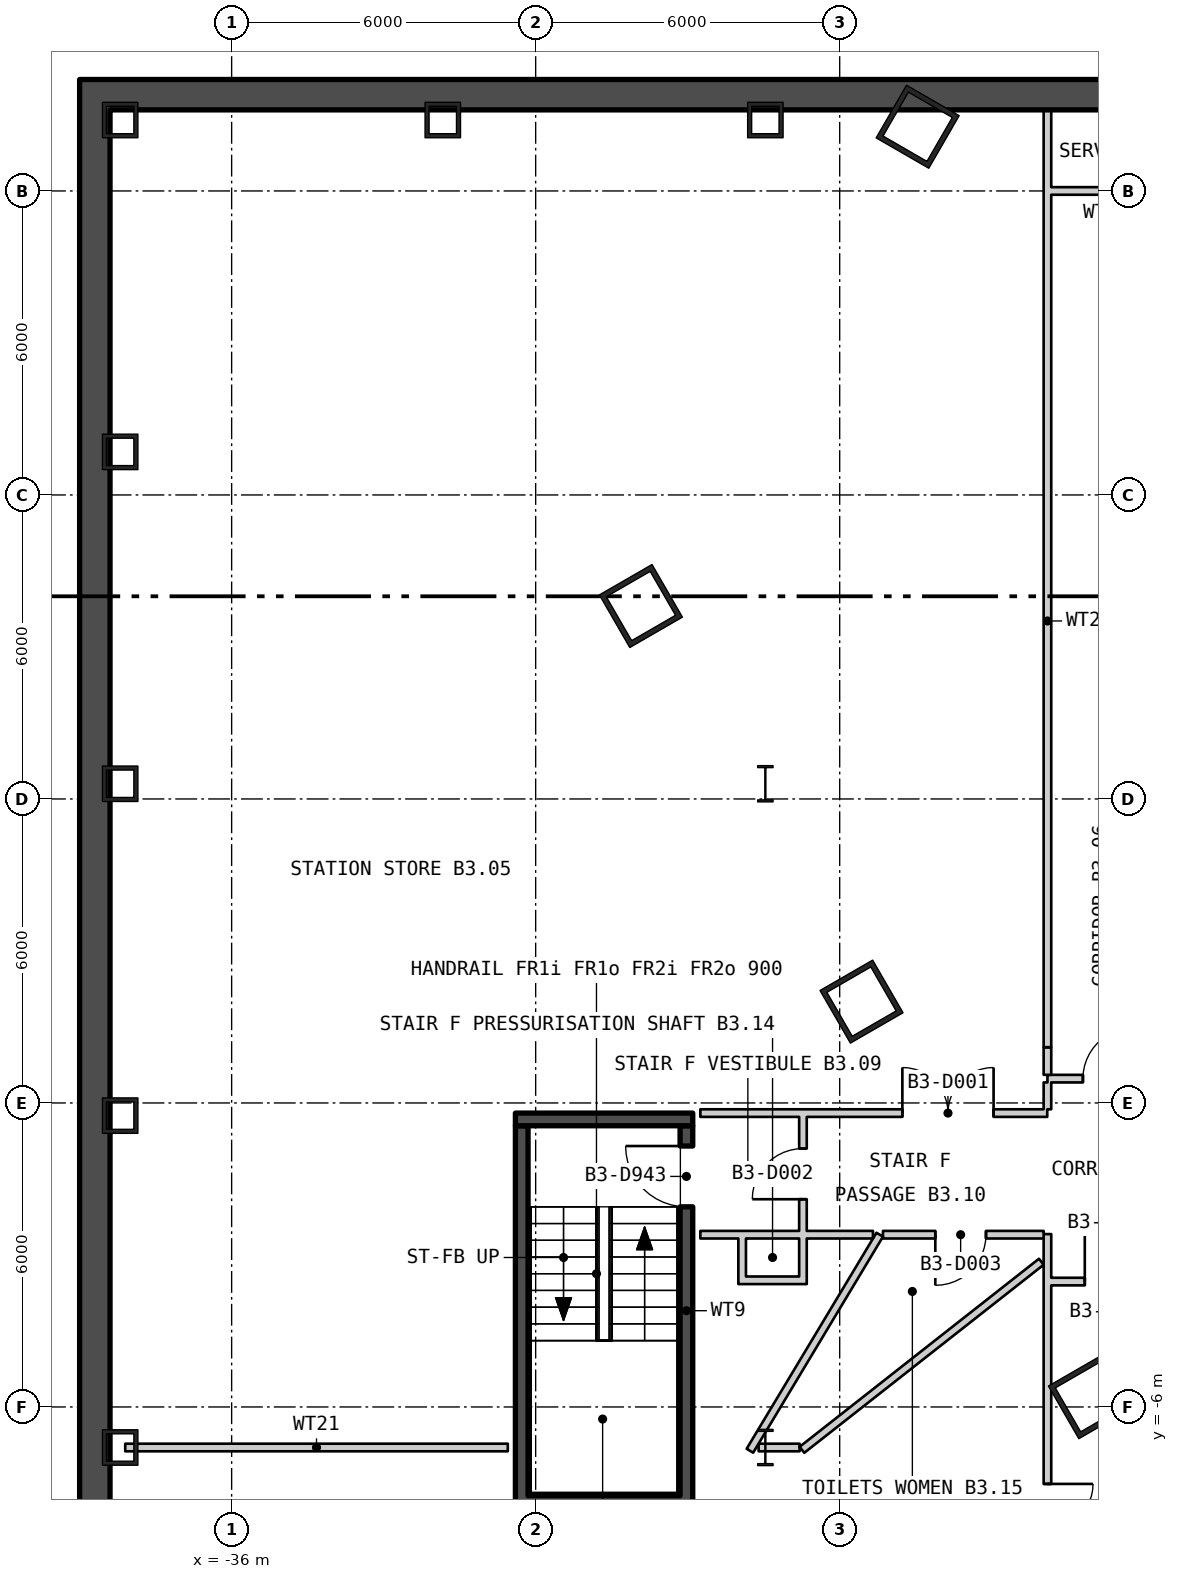
"""IFC4 building model, lengths in metres.
Left out: names, types, materials, properties, quantities, classifications, styles, units other than length and angle.
Written with IfcOpenShell. Run it as: python <this file> out.ifc"""

import sys

from ifc_helpers import new_model, si_unit, direction, frame, frame_2d, origin, origin_2d, place, context, subcontext, project, spatial, rectangle, hollow_rectangle, i_section, extrude, element, fill, save


model = new_model("IFC4")
c1 = context("Model", 3, precision=1e-05, world=origin(), true_north=direction((0.0, 1.0)))
c2 = subcontext(c1, "Body", "Model", "MODEL_VIEW")
j1 = project(units=[si_unit("LENGTHUNIT", "METRE"), si_unit("PLANEANGLEUNIT", "RADIAN")], contexts=[c1])
p1 = place(None, origin())
s1 = spatial("IfcSite", under=j1, at=p1, CompositionType="ELEMENT")
p2 = place(p1, origin())
s2 = spatial("IfcBuilding", under=s1, at=p2, CompositionType="ELEMENT")
p3 = place(p2, frame((0.0, 0.0, -16.8)))
s3 = spatial("IfcBuildingStorey", under=s2, at=p3, CompositionType="ELEMENT", Elevation=-16.8)
for number, where, z_axis, x_axis in (
    (1, (-22.461, 19.267, 0.0), (0.0, 0.0, 1.0), (-0.5, -0.866, 0.0)),
    (2, (-27.923, 9.808, 0.0), (0.0, 0.0, 1.0), (0.5, -0.866, 0.0)),
    (3, (-23.569, 2.0, 0.0), (0.0, 0.0, 1.0), (0.5, -0.866, 0.0)),
    (4, (-19.061, -5.807, 0.0), (0.0, 0.0, 1.0), (0.5, -0.866, 0.0)),
):
    element("IfcColumn", number, at=place(p3, frame(where, z_axis=z_axis, x_axis=x_axis)), inside=s3, PredefinedType="COLUMN", context=c2, shape_type="SweptSolid", body=[
        extrude(hollow_rectangle(XDim=1.2, YDim=1.2, WallThickness=0.1, at=origin_2d()), origin(), (0.0, 0.0, 1.0), 5.4),
    ])
for number, where, z_axis, x_axis in (
    (5, (-25.467, 19.4, 0.0), (0.0, 0.0, 1.0), (-1.0, 0.0, 0.0)),
    (6, (-31.833, 19.4, 0.0), (0.0, 0.0, 1.0), (-1.0, 0.0, 0.0)),
    (7, (-38.2, 19.4, 0.0), (0.0, 0.0, 1.0), (0.0, -1.0, 0.0)),
    (8, (-38.2, 12.85, 0.0), (0.0, 0.0, 1.0), (0.0, -1.0, 0.0)),
    (9, (-38.2, 6.3, 0.0), (0.0, 0.0, 1.0), (0.0, -1.0, 0.0)),
    (10, (-38.2, -0.25, 0.0), (0.0, 0.0, 1.0), (0.0, -1.0, 0.0)),
    (11, (-38.2, -6.8, 0.0), (0.0, 0.0, 1.0), (0.0, -1.0, 0.0)),
):
    element("IfcColumn", number, at=place(p3, frame(where, z_axis=z_axis, x_axis=x_axis)), inside=s3, PredefinedType="COLUMN", context=c2, shape_type="SweptSolid", body=[
        extrude(hollow_rectangle(XDim=0.7, YDim=0.7, WallThickness=0.08, at=origin_2d()), origin(), (0.0, 0.0, 1.0), 5.4),
    ])
for number, where, z_axis, x_axis in (
    (12, (-25.467, 6.3, 0.0), (0.0, 0.0, 1.0), (1.0, 0.0, 0.0)),
    (13, (-25.467, -6.8, 0.0), (0.0, 0.0, 1.0), (1.0, 0.0, 0.0)),
):
    element("IfcColumn", number, at=place(p3, frame(where, z_axis=z_axis, x_axis=x_axis)), inside=s3, PredefinedType="COLUMN", context=c2, shape_type="SweptSolid", body=[
        extrude(i_section(OverallWidth=0.304, OverallDepth=0.716, WebThickness=0.021, FlangeThickness=0.04, at=origin_2d()), origin(), (0.0, 0.0, 1.0), 5.4),
    ])
p4 = place(p3, frame((-39.0, 19.9, -0.4), z_axis=(0.0, 0.0, 1.0), x_axis=(1.0, 0.0, 0.0)))
e14 = element("IfcWall", 14, at=p4, inside=s3, PredefinedType="STANDARD", context=c2, shape_type="SweptSolid", body=[
    extrude(rectangle(XDim=78.0, YDim=0.6, at=frame_2d((39.0, 0.0))), origin(), (0.0, 0.0, 1.0), 5.4),
])
p5 = place(p3, frame((-38.7, -33.2, -0.4), z_axis=(0.0, 0.0, 1.0), x_axis=(0.0, 1.0, 0.0)))
e15 = element("IfcWall", 15, at=p5, inside=s3, PredefinedType="STANDARD", context=c2, shape_type="SweptSolid", body=[
    extrude(rectangle(XDim=52.8, YDim=0.6, at=frame_2d((26.4, 0.0))), origin(), (0.0, 0.0, 1.0), 5.4),
])
p6 = place(p3, frame((-30.275, -7.75, 0.0), z_axis=(0.0, 0.0, 1.0), x_axis=(0.0, 1.0, 0.0)))
e16 = element("IfcWall", 16, at=p6, inside=s3, PredefinedType="SHEAR", context=c2, shape_type="SweptSolid", body=[
    extrude(rectangle(XDim=7.3, YDim=0.25, at=frame_2d((3.65, 0.0))), origin(), (0.0, 0.0, 1.0), 4.95),
])
p7 = place(p3, frame((-27.025, -7.75, 0.0), z_axis=(0.0, 0.0, 1.0), x_axis=(0.0, 1.0, 0.0)))
e17 = element("IfcWall", 17, at=p7, inside=s3, PredefinedType="SHEAR", context=c2, shape_type="SweptSolid", body=[
    extrude(rectangle(XDim=7.3, YDim=0.25, at=frame_2d((3.65, 0.0))), origin(), (0.0, 0.0, 1.0), 4.95),
])
p8 = place(p7, frame((5.7, 0.0, 0.0)))
e18 = element("IfcOpeningElement", 18, at=p8, cuts=e17, PredefinedType="OPENING", context=c2, shape_type="SweptSolid", body=[
    extrude(rectangle(XDim=1.2, YDim=2.1, at=frame_2d((0.6, 1.05))), frame((0.0, 0.135, 0.0), z_axis=(0.0, -1.0, 0.0), x_axis=(1.0, 0.0, 0.0)), (0.0, 0.0, 1.0), 0.27),
])
for number, where, z_axis, x_axis in (
    (19, (-30.4, -7.875, 0.0), (0.0, 0.0, 1.0), (1.0, 0.0, 0.0)),
    (20, (-30.4, -0.325, 0.0), (0.0, 0.0, 1.0), (1.0, 0.0, 0.0)),
):
    element("IfcWall", number, at=place(p3, frame(where, z_axis=z_axis, x_axis=x_axis)), inside=s3, PredefinedType="SHEAR", context=c2, shape_type="SweptSolid", body=[
        extrude(rectangle(XDim=3.5, YDim=0.25, at=frame_2d((1.75, 0.0))), origin(), (0.0, 0.0, 1.0), 4.95),
    ])
p9 = place(p3, frame((-38.1, -6.8, 0.0), z_axis=(0.0, 0.0, 1.0), x_axis=(1.0, 0.0, 0.0)))
e21 = element("IfcWall", 21, at=p9, inside=s3, PredefinedType="PARTITIONING", context=c2, shape_type="SweptSolid", body=[
    extrude(rectangle(XDim=7.55, YDim=0.15, at=frame_2d((3.775, 0.0))), origin(), (0.0, 0.0, 1.0), 4.95),
])
p10 = place(p3, frame((-26.75, -2.6, 0.0), z_axis=(0.0, 0.0, 1.0), x_axis=(1.0, 0.0, 0.0)))
e22 = element("IfcWall", 22, at=p10, inside=s3, PredefinedType="PARTITIONING", context=c2, shape_type="SweptSolid", body=[
    extrude(rectangle(XDim=0.813, YDim=0.15, at=frame_2d((0.406, 0.0))), origin(), (0.0, 0.0, 1.0), 4.95),
])
p11 = place(p3, frame((-26.75, -0.2, 0.0), z_axis=(0.0, 0.0, 1.0), x_axis=(1.0, 0.0, 0.0)))
e23 = element("IfcWall", 23, at=p11, inside=s3, PredefinedType="PARTITIONING", context=c2, shape_type="SweptSolid", body=[
    extrude(rectangle(XDim=6.846, YDim=0.15, at=frame_2d((3.423, 0.0))), origin(), (0.0, 0.0, 1.0), 4.95),
])
p12 = place(p11, frame((3.987, 0.0, 0.0)))
e24 = element("IfcOpeningElement", 24, at=p12, cuts=e23, PredefinedType="OPENING", context=c2, shape_type="SweptSolid", body=[
    extrude(rectangle(XDim=1.8, YDim=2.1, at=frame_2d((0.9, 1.05))), frame((0.0, 0.085, 0.0), z_axis=(0.0, -1.0, 0.0), x_axis=(1.0, 0.0, 0.0)), (0.0, 0.0, 1.0), 0.17),
])
p13 = place(p3, frame((-26.0, -3.5, 0.0), z_axis=(0.0, 0.0, 1.0), x_axis=(1.0, 0.0, 0.0)))
e25 = element("IfcWall", 25, at=p13, inside=s3, PredefinedType="PARTITIONING", context=c2, shape_type="SweptSolid", body=[
    extrude(rectangle(XDim=1.35, YDim=0.15, at=frame_2d((0.675, 0.0))), origin(), (0.0, 0.0, 1.0), 4.95),
])
p14 = place(p3, frame((-25.937, -2.6, 0.0), z_axis=(0.0, 0.0, 1.0), x_axis=(1.0, 0.0, 0.0)))
e26 = element("IfcWall", 26, at=p14, inside=s3, PredefinedType="PARTITIONING", context=c2, shape_type="SweptSolid", body=[
    extrude(rectangle(XDim=1.287, YDim=0.15, at=frame_2d((0.643, 0.0))), origin(), (0.0, 0.0, 1.0), 4.95),
])
p15 = place(p3, frame((-25.925, -3.425, 0.0), z_axis=(0.0, 0.0, 1.0), x_axis=(0.0, 1.0, 0.0)))
e27 = element("IfcWall", 27, at=p15, inside=s3, PredefinedType="PARTITIONING", context=c2, shape_type="SweptSolid", body=[
    extrude(rectangle(XDim=0.75, YDim=0.15, at=frame_2d((0.375, 0.0))), origin(), (0.0, 0.0, 1.0), 4.95),
])
p16 = place(p3, frame((-25.772, -6.864, 0.0), z_axis=(0.0, 0.0, 1.0), x_axis=(0.515027783153, 0.85717348453, 0.0)))
e28 = element("IfcWall", 28, at=p16, inside=s3, PredefinedType="PARTITIONING", context=c2, shape_type="SweptSolid", body=[
    extrude(rectangle(XDim=4.974, YDim=0.15, at=frame_2d((2.487, 0.0))), origin(), (0.0, 0.0, 1.0), 4.95),
])
p17 = place(p3, frame((-25.6, -6.8, 0.0), z_axis=(0.0, 0.0, 1.0), x_axis=(1.0, 0.0, 0.0)))
e29 = element("IfcWall", 29, at=p17, inside=s3, PredefinedType="PARTITIONING", context=c2, shape_type="SweptSolid", body=[
    extrude(rectangle(XDim=0.809, YDim=0.15, at=frame_2d((0.405, 0.0))), origin(), (0.0, 0.0, 1.0), 4.95),
])
p18 = place(p3, frame((-24.745, -6.846, 0.0), z_axis=(0.0, 0.0, 1.0), x_axis=(0.786295235231, 0.617850955372, 0.0)))
e30 = element("IfcWall", 30, at=p18, inside=s3, PredefinedType="PARTITIONING", context=c2, shape_type="SweptSolid", body=[
    extrude(rectangle(XDim=6.008, YDim=0.15, at=frame_2d((3.004, 0.0))), origin(), (0.0, 0.0, 1.0), 4.95),
])
p19 = place(p3, frame((-24.725, -3.425, 0.0), z_axis=(0.0, 0.0, 1.0), x_axis=(0.0, 1.0, 0.0)))
e31 = element("IfcWall", 31, at=p19, inside=s3, PredefinedType="PARTITIONING", context=c2, shape_type="SweptSolid", body=[
    extrude(rectangle(XDim=0.75, YDim=0.15, at=frame_2d((0.375, 0.0))), origin(), (0.0, 0.0, 1.0), 4.95),
])
p20 = place(p3, frame((-24.725, -2.525, 0.0), z_axis=(0.0, 0.0, 1.0), x_axis=(0.0, 1.0, 0.0)))
e32 = element("IfcWall", 32, at=p20, inside=s3, PredefinedType="PARTITIONING", context=c2, shape_type="SweptSolid", body=[
    extrude(rectangle(XDim=2.25, YDim=0.15, at=frame_2d((1.125, 0.0))), origin(), (0.0, 0.0, 1.0), 4.95),
])
p21 = place(p20, frame((0.625, 0.0, 0.0)))
e33 = element("IfcOpeningElement", 33, at=p21, cuts=e32, PredefinedType="OPENING", context=c2, shape_type="SweptSolid", body=[
    extrude(rectangle(XDim=1.0, YDim=2.1, at=frame_2d((0.5, 1.05))), frame((0.0, 0.085, 0.0), z_axis=(0.0, -1.0, 0.0), x_axis=(1.0, 0.0, 0.0)), (0.0, 0.0, 1.0), 0.17),
])
p22 = place(p3, frame((-24.65, -2.6, 0.0), z_axis=(0.0, 0.0, 1.0), x_axis=(1.0, 0.0, 0.0)))
e34 = element("IfcWall", 34, at=p22, inside=s3, PredefinedType="PARTITIONING", context=c2, shape_type="SweptSolid", body=[
    extrude(rectangle(XDim=1.307, YDim=0.15, at=frame_2d((0.653, 0.0))), origin(), (0.0, 0.0, 1.0), 4.95),
])
p23 = place(p3, frame((-23.146, -2.6, 0.0), z_axis=(0.0, 0.0, 1.0), x_axis=(1.0, 0.0, 0.0)))
e35 = element("IfcWall", 35, at=p23, inside=s3, PredefinedType="PARTITIONING", context=c2, shape_type="SweptSolid", body=[
    extrude(rectangle(XDim=3.171, YDim=0.15, at=frame_2d((1.585, 0.0))), origin(), (0.0, 0.0, 1.0), 4.95),
])
p24 = place(p23, frame((1.033, 0.0, 0.0)))
e36 = element("IfcOpeningElement", 36, at=p24, cuts=e35, PredefinedType="OPENING", context=c2, shape_type="SweptSolid", body=[
    extrude(rectangle(XDim=1.0, YDim=2.1, at=frame_2d((0.5, 1.05))), frame((0.0, 0.085, 0.0), z_axis=(0.0, -1.0, 0.0), x_axis=(1.0, 0.0, 0.0)), (0.0, 0.0, 1.0), 0.17),
])
p25 = place(p3, frame((-19.975, 18.0, 0.0), z_axis=(0.0, 0.0, 1.0), x_axis=(1.0, 0.0, 0.0)))
e37 = element("IfcWall", 37, at=p25, inside=s3, PredefinedType="PARTITIONING", context=c2, shape_type="SweptSolid", body=[
    extrude(rectangle(XDim=2.475, YDim=0.15, at=frame_2d((1.238, 0.0))), origin(), (0.0, 0.0, 1.0), 4.95),
])
p26 = place(p3, frame((-19.9, -14.627, 0.0), z_axis=(0.0, 0.0, 1.0), x_axis=(0.0, 1.0, 0.0)))
e38 = element("IfcWall", 38, at=p26, inside=s3, PredefinedType="PARTITIONING", context=c2, shape_type="SweptSolid", body=[
    extrude(rectangle(XDim=12.039, YDim=0.15, at=frame_2d((6.019, 0.0))), origin(), (0.0, 0.0, 1.0), 4.95),
])
p27 = place(p26, frame((0.2, 0.0, 0.0)))
e39 = element("IfcOpeningElement", 39, at=p27, cuts=e38, PredefinedType="OPENING", context=c2, shape_type="SweptSolid", body=[
    extrude(rectangle(XDim=1.8, YDim=2.1, at=frame_2d((0.9, 1.05))), frame((0.0, 0.085, 0.0), z_axis=(0.0, -1.0, 0.0), x_axis=(1.0, 0.0, 0.0)), (0.0, 0.0, 1.0), 0.17),
])
p28 = place(p26, frame((5.308, 0.0, 0.0)))
e40 = element("IfcOpeningElement", 40, at=p28, cuts=e38, PredefinedType="OPENING", context=c2, shape_type="SweptSolid", body=[
    extrude(rectangle(XDim=1.8, YDim=2.1, at=frame_2d((0.9, 1.05))), frame((0.0, 0.085, 0.0), z_axis=(0.0, -1.0, 0.0), x_axis=(1.0, 0.0, 0.0)), (0.0, 0.0, 1.0), 0.17),
])
p29 = place(p3, frame((-19.9, -0.125, 0.0), z_axis=(0.0, 0.0, 1.0), x_axis=(0.0, 1.0, 0.0)))
e41 = element("IfcWall", 41, at=p29, inside=s3, PredefinedType="PARTITIONING", context=c2, shape_type="SweptSolid", body=[
    extrude(rectangle(XDim=0.53, YDim=0.15, at=frame_2d((0.265, 0.0))), origin(), (0.0, 0.0, 1.0), 4.95),
])
p30 = place(p3, frame((-19.9, 0.48, 0.0), z_axis=(0.0, 0.0, 1.0), x_axis=(1.0, 0.0, 0.0)))
e42 = element("IfcWall", 42, at=p30, inside=s3, PredefinedType="PARTITIONING", context=c2, shape_type="SweptSolid", body=[
    extrude(rectangle(XDim=2.4, YDim=0.15, at=frame_2d((1.2, 0.0))), origin(), (0.0, 0.0, 1.0), 4.95),
])
p31 = place(p30, frame((0.7, 0.0, 0.0)))
e43 = element("IfcOpeningElement", 43, at=p31, cuts=e42, PredefinedType="OPENING", context=c2, shape_type="SweptSolid", body=[
    extrude(rectangle(XDim=1.0, YDim=2.1, at=frame_2d((0.5, 1.05))), frame((0.0, 0.085, 0.0), z_axis=(0.0, -1.0, 0.0), x_axis=(1.0, 0.0, 0.0)), (0.0, 0.0, 1.0), 0.17),
])
p32 = place(p3, frame((-19.9, 0.555, 0.0), z_axis=(0.0, 0.0, 1.0), x_axis=(0.0, 1.0, 0.0)))
e44 = element("IfcWall", 44, at=p32, inside=s3, PredefinedType="PARTITIONING", context=c2, shape_type="SweptSolid", body=[
    extrude(rectangle(XDim=0.541, YDim=0.15, at=frame_2d((0.271, 0.0))), origin(), (0.0, 0.0, 1.0), 4.95),
])
p33 = place(p3, frame((-19.9, 1.101, 0.0), z_axis=(0.0, 0.0, 1.0), x_axis=(0.0, 1.0, 0.0)))
e45 = element("IfcWall", 45, at=p33, inside=s3, PredefinedType="PARTITIONING", context=c2, shape_type="SweptSolid", body=[
    extrude(rectangle(XDim=16.824, YDim=0.15, at=frame_2d((8.412, 0.0))), origin(), (0.0, 0.0, 1.0), 4.95),
])
p34 = place(p3, frame((-19.9, 18.075, 0.0), z_axis=(0.0, 0.0, 1.0), x_axis=(0.0, 1.0, 0.0)))
e46 = element("IfcWall", 46, at=p34, inside=s3, PredefinedType="PARTITIONING", context=c2, shape_type="SweptSolid", body=[
    extrude(rectangle(XDim=1.675, YDim=0.15, at=frame_2d((0.838, 0.0))), origin(), (0.0, 0.0, 1.0), 4.95),
])
p35 = place(p3, frame((-19.825, -3.525, 0.0), z_axis=(0.0, 0.0, 1.0), x_axis=(1.0, 0.0, 0.0)))
e47 = element("IfcWall", 47, at=p35, inside=s3, PredefinedType="PARTITIONING", context=c2, shape_type="SweptSolid", body=[
    extrude(rectangle(XDim=2.325, YDim=0.15, at=frame_2d((1.163, 0.0))), origin(), (0.0, 0.0, 1.0), 4.95),
])
p36 = place(p35, frame((0.662, 0.0, 0.0)))
e48 = element("IfcOpeningElement", 48, at=p36, cuts=e47, PredefinedType="OPENING", context=c2, shape_type="SweptSolid", body=[
    extrude(rectangle(XDim=1.0, YDim=2.1, at=frame_2d((0.5, 1.05))), frame((0.0, 0.085, 0.0), z_axis=(0.0, -1.0, 0.0), x_axis=(1.0, 0.0, 0.0)), (0.0, 0.0, 1.0), 0.17),
])
p37 = place(p8, origin())
e49 = element("IfcDoor", 49, at=p37, inside=s3, OperationType="SINGLE_SWING_LEFT", PredefinedType="DOOR", context=c2, shape_type="SweptSolid", body=[
    extrude(rectangle(XDim=1.2, YDim=2.1, at=frame_2d((0.6, 1.05))), frame((0.0, 0.025, 0.0), z_axis=(0.0, -1.0, 0.0), x_axis=(1.0, 0.0, 0.0)), (0.0, 0.0, 1.0), 0.05),
])
fill(e18, e49)
p38 = place(p12, origin())
e50 = element("IfcDoor", 50, at=p38, inside=s3, OperationType="DOUBLE_DOOR_SINGLE_SWING", PredefinedType="DOOR", context=c2, shape_type="SweptSolid", body=[
    extrude(rectangle(XDim=1.8, YDim=2.1, at=frame_2d((0.9, 1.05))), frame((0.0, 0.025, 0.0), z_axis=(0.0, -1.0, 0.0), x_axis=(1.0, 0.0, 0.0)), (0.0, 0.0, 1.0), 0.05),
])
fill(e24, e50)
p39 = place(p21, origin())
e51 = element("IfcDoor", 51, at=p39, inside=s3, OperationType="SINGLE_SWING_RIGHT", PredefinedType="DOOR", context=c2, shape_type="SweptSolid", body=[
    extrude(rectangle(XDim=1.0, YDim=2.1, at=frame_2d((0.5, 1.05))), frame((0.0, 0.025, 0.0), z_axis=(0.0, -1.0, 0.0), x_axis=(1.0, 0.0, 0.0)), (0.0, 0.0, 1.0), 0.05),
])
fill(e33, e51)
p40 = place(p24, origin())
e52 = element("IfcDoor", 52, at=p40, inside=s3, OperationType="SINGLE_SWING_LEFT", PredefinedType="DOOR", context=c2, shape_type="SweptSolid", body=[
    extrude(rectangle(XDim=1.0, YDim=2.1, at=frame_2d((0.5, 1.05))), frame((0.0, 0.025, 0.0), z_axis=(0.0, -1.0, 0.0), x_axis=(1.0, 0.0, 0.0)), (0.0, 0.0, 1.0), 0.05),
])
fill(e36, e52)
p41 = place(p28, origin())
e53 = element("IfcDoor", 53, at=p41, inside=s3, OperationType="DOUBLE_DOOR_SINGLE_SWING", PredefinedType="DOOR", context=c2, shape_type="SweptSolid", body=[
    extrude(rectangle(XDim=1.8, YDim=2.1, at=frame_2d((0.9, 1.05))), frame((0.0, 0.025, 0.0), z_axis=(0.0, -1.0, 0.0), x_axis=(1.0, 0.0, 0.0)), (0.0, 0.0, 1.0), 0.05),
])
fill(e40, e53)
p42 = place(p31, origin())
e54 = element("IfcDoor", 54, at=p42, inside=s3, OperationType="SINGLE_SWING_LEFT", PredefinedType="DOOR", context=c2, shape_type="SweptSolid", body=[
    extrude(rectangle(XDim=1.0, YDim=2.1, at=frame_2d((0.5, 1.05))), frame((0.0, 0.025, 0.0), z_axis=(0.0, -1.0, 0.0), x_axis=(1.0, 0.0, 0.0)), (0.0, 0.0, 1.0), 0.05),
])
fill(e43, e54)
p43 = place(p36, origin())
e55 = element("IfcDoor", 55, at=p43, inside=s3, OperationType="SINGLE_SWING_RIGHT", PredefinedType="DOOR", context=c2, shape_type="SweptSolid", body=[
    extrude(rectangle(XDim=1.0, YDim=2.1, at=frame_2d((0.5, 1.05))), frame((0.0, 0.025, 0.0), z_axis=(0.0, -1.0, 0.0), x_axis=(1.0, 0.0, 0.0)), (0.0, 0.0, 1.0), 0.05),
])
fill(e48, e55)
save(model, sys.argv[1])
